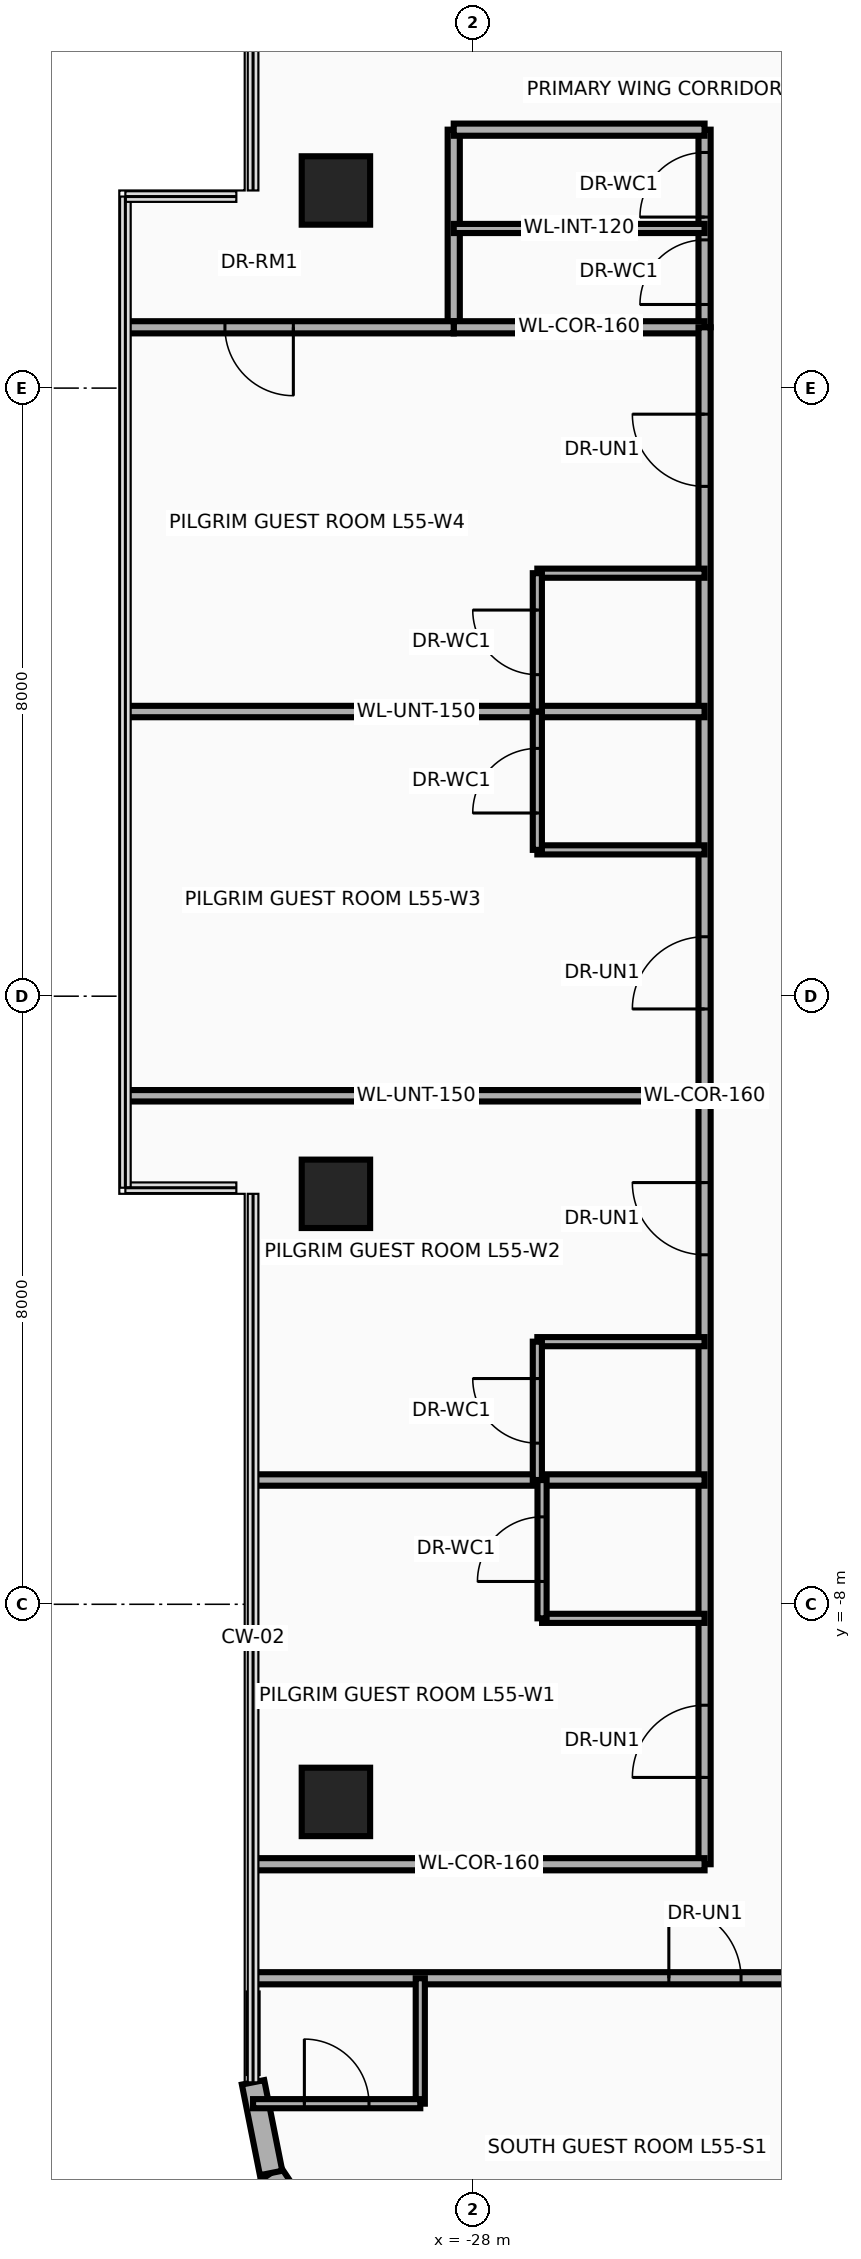
"""IFC4 building model, lengths in metres.
Left out: names, types, materials, properties, quantities, classifications, styles, units other than length and angle.
Written with IfcOpenShell. Run it as: python <this file> out.ifc"""

import sys

from ifc_helpers import new_model, si_unit, direction, frame, frame_2d, origin, origin_2d, place, context, subcontext, project, spatial, rectangle, extrude, source, transform, mapped, element, fill, save


model = new_model("IFC4")
c1 = context("Model", 3, precision=1e-05, world=origin(), true_north=direction((0.0, 1.0)))
c2 = subcontext(c1, "Body", "Model", "MODEL_VIEW")
j1 = project(units=[si_unit("LENGTHUNIT", "METRE"), si_unit("PLANEANGLEUNIT", "RADIAN")], contexts=[c1])
p1 = place(None, origin())
s1 = spatial("IfcSite", under=j1, at=p1, CompositionType="ELEMENT")
p2 = place(p1, origin())
s2 = spatial("IfcBuilding", under=s1, at=p2, CompositionType="ELEMENT")
p3 = place(p2, frame((0.0, 0.0, 216.0)))
s3 = spatial("IfcBuildingStorey", under=s2, at=p3, CompositionType="ELEMENT", Elevation=216.0)
m1 = source(origin(), c2, "Body", "SweptSolid", [
    extrude(rectangle(XDim=0.9, YDim=0.9, at=origin_2d()), origin(), (0.0, 0.0, 1.0), 3.5),
])
for number, where, z_axis, x_axis in (
    (1, (-29.8, -10.6, 0.0), (0.0, 0.0, 1.0), (1.0, 0.0, 0.0)),
    (2, (-29.8, -2.6, 0.0), (0.0, 0.0, 1.0), (1.0, 0.0, 0.0)),
    (3, (-29.8, 10.6, 0.0), (0.0, 0.0, 1.0), (1.0, 0.0, 0.0)),
):
    element("IfcColumn", number, at=place(p3, frame(where, z_axis=z_axis, x_axis=x_axis)), inside=s3, PredefinedType="COLUMN", context=c2, shape_type="MappedRepresentation", body=[
        mapped(m1, transform((0.0, 0.0, 0.0), x_axis=(1.0, 0.0, 0.0), y_axis=(0.0, 1.0, 0.0), z_axis=(0.0, 0.0, 1.0), scale=1.0)),
    ])
p4 = place(p3, frame((-29.983, -16.483, 0.0), z_axis=(0.0, 0.0, 1.0), x_axis=(-0.555635100982, 0.831426265255, 0.0)))
e4 = element("IfcWall", 4, at=p4, inside=s3, PredefinedType="SOLIDWALL", context=c2, shape_type="SweptSolid", body=[
    extrude(rectangle(XDim=1.205, YDim=0.3, at=frame_2d((0.603, 0.0))), origin(), (0.0, 0.0, 1.0), 3.26),
])
p5 = place(p3, frame((-30.653, -15.482, 0.0), z_axis=(0.0, 0.0, 1.0), x_axis=(-0.194996050505, 0.980804027463, 0.0)))
e5 = element("IfcWall", 5, at=p5, inside=s3, PredefinedType="SOLIDWALL", context=c2, shape_type="SweptSolid", body=[
    extrude(rectangle(XDim=1.216, YDim=0.3, at=frame_2d((0.608, 0.0))), origin(), (0.0, 0.0, 1.0), 3.26),
])
p6 = place(p3, frame((-28.25, 8.8, 0.0), z_axis=(0.0, 0.0, 1.0), x_axis=(0.0, 1.0, 0.0)))
e6 = element("IfcWall", 6, at=p6, inside=s3, PredefinedType="PARTITIONING", context=c2, shape_type="SweptSolid", body=[
    extrude(rectangle(XDim=2.6, YDim=0.16, at=frame_2d((1.3, 0.0))), origin(), (0.0, 0.0, 1.0), 2.544),
])
p7 = place(p3, frame((-24.95, 8.8, 0.0), z_axis=(0.0, 0.0, 1.0), x_axis=(0.0, 1.0, 0.0)))
e7 = element("IfcWall", 7, at=p7, inside=s3, PredefinedType="PARTITIONING", context=c2, shape_type="SweptSolid", body=[
    extrude(rectangle(XDim=2.6, YDim=0.16, at=frame_2d((1.3, 0.0))), origin(), (0.0, 0.0, 1.0), 2.544),
])
p8 = place(p7, frame((0.3, 0.0, 0.0)))
e8 = element("IfcOpeningElement", 8, at=p8, cuts=e7, PredefinedType="OPENING", context=c2, shape_type="SweptSolid", body=[
    extrude(rectangle(XDim=0.85, YDim=2.1, at=frame_2d((0.425, 1.05))), frame((0.0, 0.095, 0.0), z_axis=(0.0, -1.0, 0.0), x_axis=(1.0, 0.0, 0.0)), (0.0, 0.0, 1.0), 0.19),
])
p9 = place(p7, frame((1.45, 0.0, 0.0)))
e9 = element("IfcOpeningElement", 9, at=p9, cuts=e7, PredefinedType="OPENING", context=c2, shape_type="SweptSolid", body=[
    extrude(rectangle(XDim=0.85, YDim=2.1, at=frame_2d((0.425, 1.05))), frame((0.0, 0.095, 0.0), z_axis=(0.0, -1.0, 0.0), x_axis=(1.0, 0.0, 0.0)), (0.0, 0.0, 1.0), 0.19),
])
for number, where, z_axis, x_axis in (
    (10, (-28.25, 8.8, 0.0), (0.0, 0.0, 1.0), (1.0, 0.0, 0.0)),
    (11, (-28.25, 11.4, 0.0), (0.0, 0.0, 1.0), (1.0, 0.0, 0.0)),
):
    element("IfcWall", number, at=place(p3, frame(where, z_axis=z_axis, x_axis=x_axis)), inside=s3, PredefinedType="PARTITIONING", context=c2, shape_type="SweptSolid", body=[
        extrude(rectangle(XDim=3.3, YDim=0.16, at=frame_2d((1.65, 0.0))), origin(), (0.0, 0.0, 1.0), 3.26),
    ])
p10 = place(p3, frame((-28.25, 10.1, 0.0), z_axis=(0.0, 0.0, 1.0), x_axis=(1.0, 0.0, 0.0)))
e12 = element("IfcWall", 12, at=p10, inside=s3, PredefinedType="PARTITIONING", context=c2, shape_type="SweptSolid", body=[
    extrude(rectangle(XDim=3.3, YDim=0.12, at=frame_2d((1.65, 0.0))), origin(), (0.0, 0.0, 1.0), 3.26),
])
p11 = place(p3, frame((-24.95, -11.42, 0.0), z_axis=(0.0, 0.0, 1.0), x_axis=(0.0, 1.0, 0.0)))
e13 = element("IfcWall", 13, at=p11, inside=s3, PredefinedType="PARTITIONING", context=c2, shape_type="SweptSolid", body=[
    extrude(rectangle(XDim=20.22, YDim=0.16, at=frame_2d((10.11, 0.0))), origin(), (0.0, 0.0, 1.0), 2.544),
])
p12 = place(p11, frame((1.142, 0.0, 0.0)))
e14 = element("IfcOpeningElement", 14, at=p12, cuts=e13, PredefinedType="OPENING", context=c2, shape_type="SweptSolid", body=[
    extrude(rectangle(XDim=0.95, YDim=2.15, at=frame_2d((0.475, 1.075))), frame((0.0, 0.095, 0.0), z_axis=(0.0, -1.0, 0.0), x_axis=(1.0, 0.0, 0.0)), (0.0, 0.0, 1.0), 0.19),
])
p13 = place(p11, frame((8.018, 0.0, 0.0)))
e15 = element("IfcOpeningElement", 15, at=p13, cuts=e13, PredefinedType="OPENING", context=c2, shape_type="SweptSolid", body=[
    extrude(rectangle(XDim=0.95, YDim=2.15, at=frame_2d((0.475, 1.075))), frame((0.0, 0.095, 0.0), z_axis=(0.0, -1.0, 0.0), x_axis=(1.0, 0.0, 0.0)), (0.0, 0.0, 1.0), 0.19),
])
p14 = place(p11, frame((11.252, 0.0, 0.0)))
e16 = element("IfcOpeningElement", 16, at=p14, cuts=e13, PredefinedType="OPENING", context=c2, shape_type="SweptSolid", body=[
    extrude(rectangle(XDim=0.95, YDim=2.15, at=frame_2d((0.475, 1.075))), frame((0.0, 0.095, 0.0), z_axis=(0.0, -1.0, 0.0), x_axis=(1.0, 0.0, 0.0)), (0.0, 0.0, 1.0), 0.19),
])
p15 = place(p11, frame((18.127, 0.0, 0.0)))
e17 = element("IfcOpeningElement", 17, at=p15, cuts=e13, PredefinedType="OPENING", context=c2, shape_type="SweptSolid", body=[
    extrude(rectangle(XDim=0.95, YDim=2.15, at=frame_2d((0.475, 1.075))), frame((0.0, 0.095, 0.0), z_axis=(0.0, -1.0, 0.0), x_axis=(1.0, 0.0, 0.0)), (0.0, 0.0, 1.0), 0.19),
])
p16 = place(p3, frame((-32.54, 8.8, 0.0), z_axis=(0.0, 0.0, 1.0), x_axis=(1.0, 0.0, 0.0)))
e18 = element("IfcWall", 18, at=p16, inside=s3, PredefinedType="PARTITIONING", context=c2, shape_type="SweptSolid", body=[
    extrude(rectangle(XDim=4.29, YDim=0.16, at=frame_2d((2.145, 0.0))), origin(), (0.0, 0.0, 1.0), 2.706),
])
p17 = place(p16, frame((1.28, 0.0, 0.0)))
e19 = element("IfcOpeningElement", 19, at=p17, cuts=e18, PredefinedType="OPENING", context=c2, shape_type="SweptSolid", body=[
    extrude(rectangle(XDim=0.9, YDim=2.1, at=frame_2d((0.45, 1.05))), frame((0.0, 0.095, 0.0), z_axis=(0.0, -1.0, 0.0), x_axis=(1.0, 0.0, 0.0)), (0.0, 0.0, 1.0), 0.19),
])
p18 = place(p3, frame((-30.89, -6.365, 0.0), z_axis=(0.0, 0.0, 1.0), x_axis=(1.0, 0.0, 0.0)))
e20 = element("IfcWall", 20, at=p18, inside=s3, PredefinedType="PARTITIONING", context=c2, shape_type="SweptSolid", body=[
    extrude(rectangle(XDim=5.94, YDim=0.15, at=frame_2d((2.97, 0.0))), origin(), (0.0, 0.0, 1.0), 2.706),
])
for number, where, z_axis, x_axis in (
    (21, (-32.54, -1.31, 0.0), (0.0, 0.0, 1.0), (1.0, 0.0, 0.0)),
    (22, (-32.54, 3.745, 0.0), (0.0, 0.0, 1.0), (1.0, 0.0, 0.0)),
):
    element("IfcWall", number, at=place(p3, frame(where, z_axis=z_axis, x_axis=x_axis)), inside=s3, PredefinedType="PARTITIONING", context=c2, shape_type="SweptSolid", body=[
        extrude(rectangle(XDim=7.59, YDim=0.15, at=frame_2d((3.795, 0.0))), origin(), (0.0, 0.0, 1.0), 2.706),
    ])
p19 = place(p3, frame((-27.088, -8.185, 0.0), z_axis=(0.0, 0.0, 1.0), x_axis=(1.0, 0.0, 0.0)))
e23 = element("IfcWall", 23, at=p19, inside=s3, PredefinedType="PARTITIONING", context=c2, shape_type="SweptSolid", body=[
    extrude(rectangle(XDim=2.138, YDim=0.12, at=frame_2d((1.069, 0.0))), origin(), (0.0, 0.0, 1.0), 3.26),
])
p20 = place(p3, frame((-27.088, -8.185, 0.0), z_axis=(0.0, 0.0, 1.0), x_axis=(0.0, 1.0, 0.0)))
e24 = element("IfcWall", 24, at=p20, inside=s3, PredefinedType="PARTITIONING", context=c2, shape_type="SweptSolid", body=[
    extrude(rectangle(XDim=1.82, YDim=0.12, at=frame_2d((0.91, 0.0))), origin(), (0.0, 0.0, 1.0), 2.839),
])
p21 = place(p20, frame((0.485, 0.0, 0.0)))
e25 = element("IfcOpeningElement", 25, at=p21, cuts=e24, PredefinedType="OPENING", context=c2, shape_type="SweptSolid", body=[
    extrude(rectangle(XDim=0.85, YDim=2.1, at=frame_2d((0.425, 1.05))), frame((0.0, 0.075, 0.0), z_axis=(0.0, -1.0, 0.0), x_axis=(1.0, 0.0, 0.0)), (0.0, 0.0, 1.0), 0.15),
])
p22 = place(p3, frame((-27.15, -4.545, 0.0), z_axis=(0.0, 0.0, 1.0), x_axis=(1.0, 0.0, 0.0)))
e26 = element("IfcWall", 26, at=p22, inside=s3, PredefinedType="PARTITIONING", context=c2, shape_type="SweptSolid", body=[
    extrude(rectangle(XDim=2.2, YDim=0.12, at=frame_2d((1.1, 0.0))), origin(), (0.0, 0.0, 1.0), 2.839),
])
p23 = place(p3, frame((-27.15, -6.365, 0.0), z_axis=(0.0, 0.0, 1.0), x_axis=(0.0, 1.0, 0.0)))
e27 = element("IfcWall", 27, at=p23, inside=s3, PredefinedType="PARTITIONING", context=c2, shape_type="SweptSolid", body=[
    extrude(rectangle(XDim=1.82, YDim=0.12, at=frame_2d((0.91, 0.0))), origin(), (0.0, 0.0, 1.0), 2.839),
])
p24 = place(p23, frame((0.485, 0.0, 0.0)))
e28 = element("IfcOpeningElement", 28, at=p24, cuts=e27, PredefinedType="OPENING", context=c2, shape_type="SweptSolid", body=[
    extrude(rectangle(XDim=0.85, YDim=2.1, at=frame_2d((0.425, 1.05))), frame((0.0, 0.075, 0.0), z_axis=(0.0, -1.0, 0.0), x_axis=(1.0, 0.0, 0.0)), (0.0, 0.0, 1.0), 0.15),
])
p25 = place(p3, frame((-27.15, 1.925, 0.0), z_axis=(0.0, 0.0, 1.0), x_axis=(1.0, 0.0, 0.0)))
e29 = element("IfcWall", 29, at=p25, inside=s3, PredefinedType="PARTITIONING", context=c2, shape_type="SweptSolid", body=[
    extrude(rectangle(XDim=2.2, YDim=0.12, at=frame_2d((1.1, 0.0))), origin(), (0.0, 0.0, 1.0), 3.26),
])
p26 = place(p3, frame((-27.15, 1.925, 0.0), z_axis=(0.0, 0.0, 1.0), x_axis=(0.0, 1.0, 0.0)))
e30 = element("IfcWall", 30, at=p26, inside=s3, PredefinedType="PARTITIONING", context=c2, shape_type="SweptSolid", body=[
    extrude(rectangle(XDim=1.82, YDim=0.12, at=frame_2d((0.91, 0.0))), origin(), (0.0, 0.0, 1.0), 2.839),
])
p27 = place(p26, frame((0.485, 0.0, 0.0)))
e31 = element("IfcOpeningElement", 31, at=p27, cuts=e30, PredefinedType="OPENING", context=c2, shape_type="SweptSolid", body=[
    extrude(rectangle(XDim=0.85, YDim=2.1, at=frame_2d((0.425, 1.05))), frame((0.0, 0.075, 0.0), z_axis=(0.0, -1.0, 0.0), x_axis=(1.0, 0.0, 0.0)), (0.0, 0.0, 1.0), 0.15),
])
p28 = place(p3, frame((-27.15, 5.565, 0.0), z_axis=(0.0, 0.0, 1.0), x_axis=(1.0, 0.0, 0.0)))
e32 = element("IfcWall", 32, at=p28, inside=s3, PredefinedType="PARTITIONING", context=c2, shape_type="SweptSolid", body=[
    extrude(rectangle(XDim=2.2, YDim=0.12, at=frame_2d((1.1, 0.0))), origin(), (0.0, 0.0, 1.0), 3.26),
])
p29 = place(p3, frame((-27.15, 3.745, 0.0), z_axis=(0.0, 0.0, 1.0), x_axis=(0.0, 1.0, 0.0)))
e33 = element("IfcWall", 33, at=p29, inside=s3, PredefinedType="PARTITIONING", context=c2, shape_type="SweptSolid", body=[
    extrude(rectangle(XDim=1.82, YDim=0.12, at=frame_2d((0.91, 0.0))), origin(), (0.0, 0.0, 1.0), 2.839),
])
p30 = place(p29, frame((0.485, 0.0, 0.0)))
e34 = element("IfcOpeningElement", 34, at=p30, cuts=e33, PredefinedType="OPENING", context=c2, shape_type="SweptSolid", body=[
    extrude(rectangle(XDim=0.85, YDim=2.1, at=frame_2d((0.425, 1.05))), frame((0.0, 0.075, 0.0), z_axis=(0.0, -1.0, 0.0), x_axis=(1.0, 0.0, 0.0)), (0.0, 0.0, 1.0), 0.15),
])
p31 = place(p3, frame((-30.89, -12.92, 0.0), z_axis=(0.0, 0.0, 1.0), x_axis=(1.0, 0.0, 0.0)))
e35 = element("IfcWall", 35, at=p31, inside=s3, PredefinedType="PARTITIONING", context=c2, shape_type="SweptSolid", body=[
    extrude(rectangle(XDim=21.28, YDim=0.16, at=frame_2d((10.64, 0.0))), origin(), (0.0, 0.0, 1.0), 2.634),
])
p32 = place(p31, frame((5.47, 0.0, 0.0)))
e36 = element("IfcOpeningElement", 36, at=p32, cuts=e35, PredefinedType="OPENING", context=c2, shape_type="SweptSolid", body=[
    extrude(rectangle(XDim=0.95, YDim=2.15, at=frame_2d((0.475, 1.075))), frame((0.0, 0.095, 0.0), z_axis=(0.0, -1.0, 0.0), x_axis=(1.0, 0.0, 0.0)), (0.0, 0.0, 1.0), 0.19),
])
p33 = place(p31, frame((15.01, 0.0, 0.0)))
e37 = element("IfcOpeningElement", 37, at=p33, cuts=e35, PredefinedType="OPENING", context=c2, shape_type="SweptSolid", body=[
    extrude(rectangle(XDim=0.95, YDim=2.15, at=frame_2d((0.475, 1.075))), frame((0.0, 0.095, 0.0), z_axis=(0.0, -1.0, 0.0), x_axis=(1.0, 0.0, 0.0)), (0.0, 0.0, 1.0), 0.19),
])
p34 = place(p3, frame((-28.69, -14.57, 0.0), z_axis=(0.0, 0.0, 1.0), x_axis=(0.0, 1.0, 0.0)))
e38 = element("IfcWall", 38, at=p34, inside=s3, PredefinedType="PARTITIONING", context=c2, shape_type="SweptSolid", body=[
    extrude(rectangle(XDim=1.65, YDim=0.12, at=frame_2d((0.825, 0.0))), origin(), (0.0, 0.0, 1.0), 3.26),
])
p35 = place(p3, frame((-30.89, -14.57, 0.0), z_axis=(0.0, 0.0, 1.0), x_axis=(1.0, 0.0, 0.0)))
e39 = element("IfcWall", 39, at=p35, inside=s3, PredefinedType="PARTITIONING", context=c2, shape_type="SweptSolid", body=[
    extrude(rectangle(XDim=2.2, YDim=0.12, at=frame_2d((1.1, 0.0))), origin(), (0.0, 0.0, 1.0), 3.26),
])
p36 = place(p35, frame((0.675, 0.0, 0.0)))
e40 = element("IfcOpeningElement", 40, at=p36, cuts=e39, PredefinedType="OPENING", context=c2, shape_type="SweptSolid", body=[
    extrude(rectangle(XDim=0.85, YDim=2.1, at=frame_2d((0.425, 1.05))), frame((0.0, 0.075, 0.0), z_axis=(0.0, -1.0, 0.0), x_axis=(1.0, 0.0, 0.0)), (0.0, 0.0, 1.0), 0.15),
])
p37 = place(p3, frame((-30.89, -14.167, 0.0), z_axis=(0.0, 0.0, 1.0), x_axis=(0.0, 1.0, 0.0)))
e41 = element("IfcWall", 41, at=p37, inside=s3, PredefinedType="PARTITIONING", context=c2, shape_type="SweptSolid", body=[
    extrude(rectangle(XDim=1.047, YDim=0.12, at=frame_2d((0.523, 0.0))), origin(), (0.0, 0.0, 1.0), 3.26),
])
p38 = place(p3, frame((-30.89, -11.42, 0.0), z_axis=(0.0, 0.0, 1.0), x_axis=(1.0, 0.0, 0.0)))
e42 = element("IfcWall", 42, at=p38, inside=s3, PredefinedType="PARTITIONING", context=c2, shape_type="SweptSolid", body=[
    extrude(rectangle(XDim=5.94, YDim=0.16, at=frame_2d((2.97, 0.0))), origin(), (0.0, 0.0, 1.0), 3.26),
])
p39 = place(p8, origin())
e43 = element("IfcDoor", 43, at=p39, inside=s3, OperationType="SINGLE_SWING_LEFT", PredefinedType="DOOR", context=c2, shape_type="SweptSolid", body=[
    extrude(rectangle(XDim=0.85, YDim=2.1, at=frame_2d((0.425, 1.05))), frame((0.0, 0.025, 0.0), z_axis=(0.0, -1.0, 0.0), x_axis=(1.0, 0.0, 0.0)), (0.0, 0.0, 1.0), 0.05),
])
fill(e8, e43)
p40 = place(p9, origin())
e44 = element("IfcDoor", 44, at=p40, inside=s3, OperationType="SINGLE_SWING_RIGHT", PredefinedType="DOOR", context=c2, shape_type="SweptSolid", body=[
    extrude(rectangle(XDim=0.85, YDim=2.1, at=frame_2d((0.425, 1.05))), frame((0.0, 0.025, 0.0), z_axis=(0.0, -1.0, 0.0), x_axis=(1.0, 0.0, 0.0)), (0.0, 0.0, 1.0), 0.05),
])
fill(e9, e44)
p41 = place(p17, frame((0.9, 0.0, 0.0), z_axis=(0.0, 0.0, 1.0), x_axis=(-1.0, 0.0, 0.0)))
e45 = element("IfcDoor", 45, at=p41, inside=s3, OperationType="SINGLE_SWING_LEFT", PredefinedType="DOOR", context=c2, shape_type="SweptSolid", body=[
    extrude(rectangle(XDim=0.9, YDim=2.1, at=frame_2d((0.45, 1.05))), frame((0.0, 0.025, 0.0), z_axis=(0.0, -1.0, 0.0), x_axis=(1.0, 0.0, 0.0)), (0.0, 0.0, 1.0), 0.05),
])
fill(e19, e45)
p42 = place(p12, origin())
e46 = element("IfcDoor", 46, at=p42, inside=s3, OperationType="SINGLE_SWING_RIGHT", PredefinedType="DOOR", context=c2, shape_type="SweptSolid", body=[
    extrude(rectangle(XDim=0.95, YDim=2.15, at=frame_2d((0.475, 1.075))), frame((0.0, 0.025, 0.0), z_axis=(0.0, -1.0, 0.0), x_axis=(1.0, 0.0, 0.0)), (0.0, 0.0, 1.0), 0.05),
])
fill(e14, e46)
p43 = place(p21, origin())
e47 = element("IfcDoor", 47, at=p43, inside=s3, OperationType="SINGLE_SWING_LEFT", PredefinedType="DOOR", context=c2, shape_type="SweptSolid", body=[
    extrude(rectangle(XDim=0.85, YDim=2.1, at=frame_2d((0.425, 1.05))), frame((0.0, 0.025, 0.0), z_axis=(0.0, -1.0, 0.0), x_axis=(1.0, 0.0, 0.0)), (0.0, 0.0, 1.0), 0.05),
])
fill(e25, e47)
p44 = place(p13, origin())
e48 = element("IfcDoor", 48, at=p44, inside=s3, OperationType="SINGLE_SWING_RIGHT", PredefinedType="DOOR", context=c2, shape_type="SweptSolid", body=[
    extrude(rectangle(XDim=0.95, YDim=2.15, at=frame_2d((0.475, 1.075))), frame((0.0, 0.025, 0.0), z_axis=(0.0, -1.0, 0.0), x_axis=(1.0, 0.0, 0.0)), (0.0, 0.0, 1.0), 0.05),
])
fill(e15, e48)
p45 = place(p24, origin())
e49 = element("IfcDoor", 49, at=p45, inside=s3, OperationType="SINGLE_SWING_LEFT", PredefinedType="DOOR", context=c2, shape_type="SweptSolid", body=[
    extrude(rectangle(XDim=0.85, YDim=2.1, at=frame_2d((0.425, 1.05))), frame((0.0, 0.025, 0.0), z_axis=(0.0, -1.0, 0.0), x_axis=(1.0, 0.0, 0.0)), (0.0, 0.0, 1.0), 0.05),
])
fill(e28, e49)
p46 = place(p14, origin())
e50 = element("IfcDoor", 50, at=p46, inside=s3, OperationType="SINGLE_SWING_RIGHT", PredefinedType="DOOR", context=c2, shape_type="SweptSolid", body=[
    extrude(rectangle(XDim=0.95, YDim=2.15, at=frame_2d((0.475, 1.075))), frame((0.0, 0.025, 0.0), z_axis=(0.0, -1.0, 0.0), x_axis=(1.0, 0.0, 0.0)), (0.0, 0.0, 1.0), 0.05),
])
fill(e16, e50)
p47 = place(p27, origin())
e51 = element("IfcDoor", 51, at=p47, inside=s3, OperationType="SINGLE_SWING_LEFT", PredefinedType="DOOR", context=c2, shape_type="SweptSolid", body=[
    extrude(rectangle(XDim=0.85, YDim=2.1, at=frame_2d((0.425, 1.05))), frame((0.0, 0.025, 0.0), z_axis=(0.0, -1.0, 0.0), x_axis=(1.0, 0.0, 0.0)), (0.0, 0.0, 1.0), 0.05),
])
fill(e31, e51)
p48 = place(p15, origin())
e52 = element("IfcDoor", 52, at=p48, inside=s3, OperationType="SINGLE_SWING_RIGHT", PredefinedType="DOOR", context=c2, shape_type="SweptSolid", body=[
    extrude(rectangle(XDim=0.95, YDim=2.15, at=frame_2d((0.475, 1.075))), frame((0.0, 0.025, 0.0), z_axis=(0.0, -1.0, 0.0), x_axis=(1.0, 0.0, 0.0)), (0.0, 0.0, 1.0), 0.05),
])
fill(e17, e52)
p49 = place(p30, origin())
e53 = element("IfcDoor", 53, at=p49, inside=s3, OperationType="SINGLE_SWING_LEFT", PredefinedType="DOOR", context=c2, shape_type="SweptSolid", body=[
    extrude(rectangle(XDim=0.85, YDim=2.1, at=frame_2d((0.425, 1.05))), frame((0.0, 0.025, 0.0), z_axis=(0.0, -1.0, 0.0), x_axis=(1.0, 0.0, 0.0)), (0.0, 0.0, 1.0), 0.05),
])
fill(e34, e53)
p50 = place(p32, origin())
e54 = element("IfcDoor", 54, at=p50, inside=s3, OperationType="SINGLE_SWING_RIGHT", PredefinedType="DOOR", context=c2, shape_type="SweptSolid", body=[
    extrude(rectangle(XDim=0.95, YDim=2.15, at=frame_2d((0.475, 1.075))), frame((0.0, 0.025, 0.0), z_axis=(0.0, -1.0, 0.0), x_axis=(1.0, 0.0, 0.0)), (0.0, 0.0, 1.0), 0.05),
])
fill(e36, e54)
p51 = place(p36, origin())
e55 = element("IfcDoor", 55, at=p51, inside=s3, OperationType="SINGLE_SWING_LEFT", PredefinedType="DOOR", context=c2, shape_type="SweptSolid", body=[
    extrude(rectangle(XDim=0.85, YDim=2.1, at=frame_2d((0.425, 1.05))), frame((0.0, 0.025, 0.0), z_axis=(0.0, -1.0, 0.0), x_axis=(1.0, 0.0, 0.0)), (0.0, 0.0, 1.0), 0.05),
])
fill(e40, e55)
save(model, sys.argv[1])
